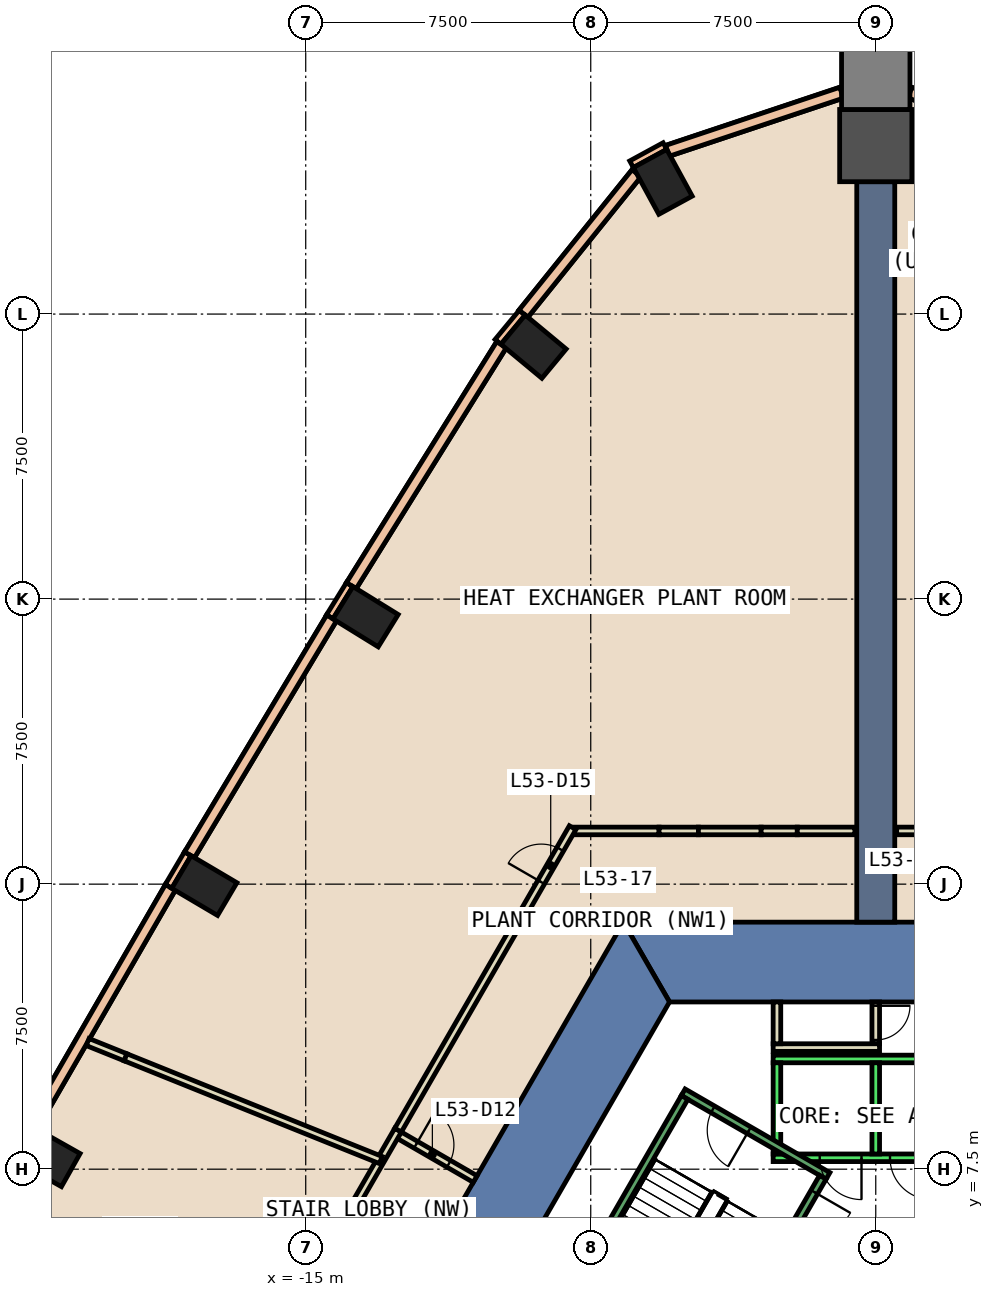
"""IFC4 building model, lengths in metres.
Left out: names, types, materials, properties, quantities, classifications, styles, units other than length and angle.
Written with IfcOpenShell. Run it as: python <this file> out.ifc"""

import sys

from ifc_helpers import new_model, si_unit, direction, frame, frame_2d, origin, origin_2d, place, context, subcontext, project, spatial, polyline, rectangle, outline, extrude, element, fill, save


model = new_model("IFC4")
c1 = context("Model", 3, precision=1e-05, world=origin(), true_north=direction((0.0, 1.0)))
c2 = subcontext(c1, "Body", "Model", "MODEL_VIEW")
j1 = project(units=[si_unit("LENGTHUNIT", "METRE"), si_unit("PLANEANGLEUNIT", "RADIAN")], contexts=[c1])
p1 = place(None, origin())
s1 = spatial("IfcSite", under=j1, at=p1, CompositionType="ELEMENT")
p2 = place(p1, origin())
s2 = spatial("IfcBuilding", under=s1, at=p2, CompositionType="ELEMENT")
p3 = place(p2, frame((0.0, 0.0, 236.0)))
s3 = spatial("IfcBuildingStorey", under=s2, at=p3, CompositionType="ELEMENT", Elevation=236.0)
p4 = place(p3, frame((0.0, 34.433, -0.6), z_axis=(0.0, 0.0, 1.0), x_axis=(0.0, 1.0, 0.0)))
e1 = element("IfcColumn", 1, at=p4, inside=s3, PredefinedType="COLUMN", context=c2, shape_type="SweptSolid", body=[
    extrude(rectangle(XDim=1.9, YDim=1.9, at=origin_2d()), origin(), (0.0, 0.0, 1.0), 5.4),
])
for number, where, z_axis, x_axis in (
    (2, (-5.604, 33.479, -0.6), (0.0, 0.0, 1.0), (0.878, 0.478, 0.0)),
    (3, (-9.005, 29.143, -0.6), (0.0, 0.0, 1.0), (0.639, 0.769, 0.0)),
    (4, (-13.425, 22.037, -0.6), (0.0, 0.0, 1.0), (0.525, 0.851, 0.0)),
    (5, (-17.668, 14.963, -0.6), (0.0, 0.0, 1.0), (0.509, 0.861, 0.0)),
    (6, (-21.792, 7.82, -0.6), (0.0, 0.0, 1.0), (0.491, 0.871, 0.0)),
):
    element("IfcColumn", number, at=place(p3, frame(where, z_axis=z_axis, x_axis=x_axis)), inside=s3, PredefinedType="COLUMN", context=c2, shape_type="SweptSolid", body=[
        extrude(rectangle(XDim=1.0, YDim=1.4, at=origin_2d()), origin(), (0.0, 0.0, 1.0), 5.4),
    ])
p5 = place(p3, frame((0.0, 36.283, -0.6), z_axis=(0.0, 0.0, 1.0), x_axis=(0.0, 1.0, 0.0)))
e7 = element("IfcColumn", 7, at=p5, inside=s3, PredefinedType="COLUMN", context=c2, shape_type="SweptSolid", body=[
    extrude(rectangle(XDim=1.8, YDim=1.8, at=origin_2d()), origin(), (0.0, 0.0, 1.0), 5.4),
])
p6 = place(p3, frame((0.0, 0.0, -0.6)))
e8 = element("IfcWall", 8, at=p6, inside=s3, PredefinedType="SHEAR", context=c2, shape_type="SweptSolid", body=[
    extrude(outline(polyline([(6.64, 14.0), (-6.64, 14.0), (-5.427, 11.9), (5.427, 11.9), (6.64, 14.0)])), origin(), (0.0, 0.0, 1.0), 5.4),
])
p7 = place(p3, frame((0.0, 0.0, -0.6)))
e9 = element("IfcWall", 9, at=p7, inside=s3, PredefinedType="SHEAR", context=c2, shape_type="SweptSolid", body=[
    extrude(outline(polyline([(-11.834, 5.002), (-10.016, 3.952), (-5.427, 11.9), (-6.64, 14.0), (-11.834, 5.002)])), origin(), (0.0, 0.0, 1.0), 5.4),
])
p8 = place(p3, frame((0.0, 14.0, 0.0), z_axis=(0.0, 0.0, 1.0), x_axis=(0.0, 1.0, 0.0)))
e10 = element("IfcWall", 10, at=p8, inside=s3, PredefinedType="SHEAR", context=c2, shape_type="SweptSolid", body=[
    extrude(rectangle(XDim=19.483, YDim=1.0, at=frame_2d((9.741, 0.0))), origin(), (0.0, 0.0, 1.0), 4.8),
])
p9 = place(p3, frame((-5.548, 34.42, 0.0), z_axis=(0.0, 0.0, 1.0), x_axis=(-0.878250009632, -0.478201757191, 0.0)))
e11 = element("IfcWall", 11, at=p9, inside=s3, PredefinedType="STANDARD", context=c2, shape_type="SweptSolid", body=[
    extrude(rectangle(XDim=1.0, YDim=0.2, at=frame_2d((0.5, 0.0))), origin(), (0.0, 0.0, 1.0), 4.8),
])
p10 = place(p3, frame((-9.302, 30.039, 0.0), z_axis=(0.0, 0.0, 1.0), x_axis=(-0.637972365578, -0.770059257953, 0.0)))
e12 = element("IfcWall", 12, at=p10, inside=s3, PredefinedType="STANDARD", context=c2, shape_type="SweptSolid", body=[
    extrude(rectangle(XDim=1.0, YDim=0.2, at=frame_2d((0.5, 0.0))), origin(), (0.0, 0.0, 1.0), 4.8),
])
p11 = place(p3, frame((-13.843, 22.883, 0.0), z_axis=(0.0, 0.0, 1.0), x_axis=(-0.525648735675, -0.850701714282, 0.0)))
e13 = element("IfcWall", 13, at=p11, inside=s3, PredefinedType="STANDARD", context=c2, shape_type="SweptSolid", body=[
    extrude(rectangle(XDim=1.0, YDim=0.2, at=frame_2d((0.5, 0.0))), origin(), (0.0, 0.0, 1.0), 4.8),
])
p12 = place(p3, frame((-18.103, 15.801, 0.0), z_axis=(0.0, 0.0, 1.0), x_axis=(-0.508161541526, -0.861261776531, 0.0)))
e14 = element("IfcWall", 14, at=p12, inside=s3, PredefinedType="STANDARD", context=c2, shape_type="SweptSolid", body=[
    extrude(rectangle(XDim=1.0, YDim=0.2, at=frame_2d((0.5, 0.0))), origin(), (0.0, 0.0, 1.0), 4.8),
])
p13 = place(p3, frame((5.481, 34.296, 0.0), z_axis=(0.0, 0.0, 1.0), x_axis=(-0.948577105871, 0.316546164433, 0.0)))
e15 = element("IfcWall", 15, at=p13, inside=s3, PredefinedType="STANDARD", context=c2, shape_type="SweptSolid", body=[
    extrude(rectangle(XDim=4.83, YDim=0.3, at=frame_2d((2.415, 0.0))), origin(), (0.0, 0.0, 1.0), 1.2),
])
p14 = place(p3, frame((5.481, 34.296, 4.0), z_axis=(0.0, 0.0, 1.0), x_axis=(-0.948577105871, 0.316546164433, 0.0)))
e16 = element("IfcWall", 16, at=p14, inside=s3, PredefinedType="STANDARD", context=c2, shape_type="SweptSolid", body=[
    extrude(rectangle(XDim=4.83, YDim=0.3, at=frame_2d((2.415, 0.0))), origin(), (0.0, 0.0, 1.0), 0.8),
])
p15 = place(p3, frame((-0.899, 35.825, 0.0), z_axis=(0.0, 0.0, 1.0), x_axis=(-0.948577105871, -0.316546164433, 0.0)))
e17 = element("IfcWall", 17, at=p15, inside=s3, PredefinedType="STANDARD", context=c2, shape_type="SweptSolid", body=[
    extrude(rectangle(XDim=4.83, YDim=0.3, at=frame_2d((2.415, 0.0))), origin(), (0.0, 0.0, 1.0), 1.2),
])
p16 = place(p3, frame((-0.899, 35.825, 4.0), z_axis=(0.0, 0.0, 1.0), x_axis=(-0.948577105871, -0.316546164433, 0.0)))
e18 = element("IfcWall", 18, at=p16, inside=s3, PredefinedType="STANDARD", context=c2, shape_type="SweptSolid", body=[
    extrude(rectangle(XDim=4.83, YDim=0.3, at=frame_2d((2.415, 0.0))), origin(), (0.0, 0.0, 1.0), 0.8),
])
p17 = place(p3, frame((-6.296, 33.705, 0.0), z_axis=(0.0, 0.0, 1.0), x_axis=(-0.627115312033, -0.778926431323, 0.0)))
e19 = element("IfcWall", 19, at=p17, inside=s3, PredefinedType="STANDARD", context=c2, shape_type="SweptSolid", body=[
    extrude(rectangle(XDim=4.742, YDim=0.3, at=frame_2d((2.371, 0.0))), origin(), (0.0, 0.0, 1.0), 1.2),
])
p18 = place(p3, frame((-6.296, 33.705, 4.0), z_axis=(0.0, 0.0, 1.0), x_axis=(-0.627115312033, -0.778926431323, 0.0)))
e20 = element("IfcWall", 20, at=p18, inside=s3, PredefinedType="STANDARD", context=c2, shape_type="SweptSolid", body=[
    extrude(rectangle(XDim=4.742, YDim=0.3, at=frame_2d((2.371, 0.0))), origin(), (0.0, 0.0, 1.0), 0.8),
])
p19 = place(p3, frame((-9.848, 29.194, 0.0), z_axis=(0.0, 0.0, 1.0), x_axis=(-0.528961462244, -0.848645845722, 0.0)))
e21 = element("IfcWall", 21, at=p19, inside=s3, PredefinedType="STANDARD", context=c2, shape_type="SweptSolid", body=[
    extrude(rectangle(XDim=7.47, YDim=0.3, at=frame_2d((3.735, 0.0))), origin(), (0.0, 0.0, 1.0), 1.2),
])
p20 = place(p3, frame((-9.848, 29.194, 4.0), z_axis=(0.0, 0.0, 1.0), x_axis=(-0.528961462244, -0.848645845722, 0.0)))
e22 = element("IfcWall", 22, at=p20, inside=s3, PredefinedType="STANDARD", context=c2, shape_type="SweptSolid", body=[
    extrude(rectangle(XDim=7.47, YDim=0.3, at=frame_2d((3.735, 0.0))), origin(), (0.0, 0.0, 1.0), 0.8),
])
p21 = place(p3, frame((-14.32, 22.003, 0.0), z_axis=(0.0, 0.0, 1.0), x_axis=(-0.51437714024, -0.857564083669, 0.0)))
e23 = element("IfcWall", 23, at=p21, inside=s3, PredefinedType="STANDARD", context=c2, shape_type="SweptSolid", body=[
    extrude(rectangle(XDim=7.265, YDim=0.3, at=frame_2d((3.632, 0.0))), origin(), (0.0, 0.0, 1.0), 1.2),
])
p22 = place(p3, frame((-14.32, 22.003, 4.0), z_axis=(0.0, 0.0, 1.0), x_axis=(-0.51437714024, -0.857564083669, 0.0)))
e24 = element("IfcWall", 24, at=p22, inside=s3, PredefinedType="STANDARD", context=c2, shape_type="SweptSolid", body=[
    extrude(rectangle(XDim=7.265, YDim=0.3, at=frame_2d((3.632, 0.0))), origin(), (0.0, 0.0, 1.0), 0.8),
])
p23 = place(p3, frame((-18.563, 14.913, 0.0), z_axis=(0.0, 0.0, 1.0), x_axis=(-0.499980331134, -0.866036759312, 0.0)))
e25 = element("IfcWall", 25, at=p23, inside=s3, PredefinedType="STANDARD", context=c2, shape_type="SweptSolid", body=[
    extrude(rectangle(XDim=7.266, YDim=0.3, at=frame_2d((3.633, 0.0))), origin(), (0.0, 0.0, 1.0), 1.2),
])
p24 = place(p3, frame((-18.563, 14.913, 4.0), z_axis=(0.0, 0.0, 1.0), x_axis=(-0.499980331134, -0.866036759312, 0.0)))
e26 = element("IfcWall", 26, at=p24, inside=s3, PredefinedType="STANDARD", context=c2, shape_type="SweptSolid", body=[
    extrude(rectangle(XDim=7.266, YDim=0.3, at=frame_2d((3.633, 0.0))), origin(), (0.0, 0.0, 1.0), 0.8),
])
p25 = place(p3, frame((0.0, 11.9, 0.0), z_axis=(0.0, 0.0, 1.0), x_axis=(0.0, -1.0, 0.0)))
e27 = element("IfcWall", 27, at=p25, inside=s3, PredefinedType="PARTITIONING", context=c2, shape_type="SweptSolid", body=[
    extrude(rectangle(XDim=1.1, YDim=0.2, at=frame_2d((0.55, 0.0))), origin(), (0.0, 0.0, 1.0), 4.8),
])
p26 = place(p25, frame((0.1, 0.0, 0.0)))
e28 = element("IfcOpeningElement", 28, at=p26, cuts=e27, PredefinedType="OPENING", context=c2, shape_type="SweptSolid", body=[
    extrude(rectangle(XDim=0.9, YDim=2.1, at=frame_2d((0.45, 1.05))), frame((0.0, 0.11, 0.0), z_axis=(0.0, -1.0, 0.0), x_axis=(1.0, 0.0, 0.0)), (0.0, 0.0, 1.0), 0.22),
])
p27 = place(p3, frame((0.1, 10.7, 0.0), z_axis=(0.0, 0.0, 1.0), x_axis=(-1.0, 0.0, 0.0)))
e29 = element("IfcWall", 29, at=p27, inside=s3, PredefinedType="PARTITIONING", context=c2, shape_type="SweptSolid", body=[
    extrude(rectangle(XDim=2.8, YDim=0.2, at=frame_2d((1.4, 0.0))), origin(), (0.0, 0.0, 1.0), 4.8),
])
p28 = place(p3, frame((-2.6, 10.8, 0.0), z_axis=(0.0, 0.0, 1.0), x_axis=(0.0, 1.0, 0.0)))
e30 = element("IfcWall", 30, at=p28, inside=s3, PredefinedType="PARTITIONING", context=c2, shape_type="SweptSolid", body=[
    extrude(rectangle(XDim=1.1, YDim=0.2, at=frame_2d((0.55, 0.0))), origin(), (0.0, 0.0, 1.0), 4.8),
])
p29 = place(p3, frame((0.55, 16.4, 0.0), z_axis=(0.0, 0.0, 1.0), x_axis=(1.0, 0.0, 0.0)))
e31 = element("IfcWall", 31, at=p29, inside=s3, PredefinedType="PARTITIONING", context=c2, shape_type="SweptSolid", body=[
    extrude(rectangle(XDim=2.294, YDim=0.2, at=frame_2d((1.147, 0.0))), origin(), (0.0, 0.0, 1.0), 4.8),
])
p30 = place(p29, frame((0.614, 0.0, 0.0)))
e32 = element("IfcOpeningElement", 32, at=p30, cuts=e31, PredefinedType="OPENING", context=c2, shape_type="SweptSolid", body=[
    extrude(rectangle(XDim=1.0, YDim=2.1, at=frame_2d((0.5, 1.05))), frame((0.0, 0.11, 0.0), z_axis=(0.0, -1.0, 0.0), x_axis=(1.0, 0.0, 0.0)), (0.0, 0.0, 1.0), 0.22),
])
p31 = place(p3, frame((0.0, 35.403, 0.0), z_axis=(0.0, 0.0, 1.0), x_axis=(0.0, 1.0, 0.0)))
e33 = element("IfcWall", 33, at=p31, inside=s3, PredefinedType="PARTITIONING", context=c2, shape_type="SweptSolid", body=[
    extrude(rectangle(XDim=0.5, YDim=0.2, at=frame_2d((0.25, 0.0))), origin(), (0.0, 0.0, 1.0), 4.8),
])
p32 = place(p3, frame((-12.62, 8.441, 0.0), z_axis=(0.0, 0.0, 1.0), x_axis=(0.865999212041, -0.500045362686, 0.0)))
e34 = element("IfcWall", 34, at=p32, inside=s3, PredefinedType="PARTITIONING", context=c2, shape_type="SweptSolid", body=[
    extrude(rectangle(XDim=2.4, YDim=0.2, at=frame_2d((1.2, 0.0))), origin(), (0.0, 0.0, 1.0), 4.8),
])
p33 = place(p32, frame((0.6, 0.0, 0.0)))
e35 = element("IfcOpeningElement", 35, at=p33, cuts=e34, PredefinedType="OPENING", context=c2, shape_type="SweptSolid", body=[
    extrude(rectangle(XDim=1.0, YDim=2.1, at=frame_2d((0.5, 1.05))), frame((0.0, 0.11, 0.0), z_axis=(0.0, -1.0, 0.0), x_axis=(1.0, 0.0, 0.0)), (0.0, 0.0, 1.0), 0.22),
])
p34 = place(p3, frame((-16.17, 2.292, 0.0), z_axis=(0.0, 0.0, 1.0), x_axis=(0.499942581134, 0.866058552045, 0.0)))
e36 = element("IfcWall", 36, at=p34, inside=s3, PredefinedType="PARTITIONING", context=c2, shape_type="SweptSolid", body=[
    extrude(rectangle(XDim=7.2, YDim=0.2, at=frame_2d((3.6, 0.0))), origin(), (0.0, 0.0, 1.0), 4.8),
])
p35 = place(p34, frame((2.51, 0.0, 0.0)))
e37 = element("IfcOpeningElement", 37, at=p35, cuts=e36, PredefinedType="OPENING", context=c2, shape_type="SweptSolid", body=[
    extrude(rectangle(XDim=1.0, YDim=2.1, at=frame_2d((0.5, 1.05))), frame((0.0, 0.11, 0.0), z_axis=(0.0, -1.0, 0.0), x_axis=(1.0, 0.0, 0.0)), (0.0, 0.0, 1.0), 0.22),
])
p36 = place(p3, frame((-7.926, 16.4, 0.0), z_axis=(0.0, 0.0, 1.0), x_axis=(1.0, 0.0, 0.0)))
e38 = element("IfcWall", 38, at=p36, inside=s3, PredefinedType="PARTITIONING", context=c2, shape_type="SweptSolid", body=[
    extrude(rectangle(XDim=2.224, YDim=0.2, at=frame_2d((1.112, 0.0))), origin(), (0.0, 0.0, 1.0), 4.8),
])
p37 = place(p3, frame((-12.57, 8.528, 0.0), z_axis=(0.0, 0.0, 1.0), x_axis=(0.499907967521, 0.866078532241, 0.0)))
e39 = element("IfcWall", 39, at=p37, inside=s3, PredefinedType="PARTITIONING", context=c2, shape_type="SweptSolid", body=[
    extrude(rectangle(XDim=9.19, YDim=0.2, at=frame_2d((4.595, 0.0))), origin(), (0.0, 0.0, 1.0), 4.8),
])
p38 = place(p37, frame((7.535, 0.0, 0.0)))
e40 = element("IfcOpeningElement", 40, at=p38, cuts=e39, PredefinedType="OPENING", context=c2, shape_type="SweptSolid", body=[
    extrude(rectangle(XDim=1.0, YDim=2.1, at=frame_2d((0.5, 1.05))), frame((0.0, 0.11, 0.0), z_axis=(0.0, -1.0, 0.0), x_axis=(1.0, 0.0, 0.0)), (0.0, 0.0, 1.0), 0.22),
])
p39 = place(p3, frame((-20.738, 10.845, 0.0), z_axis=(0.0, 0.0, 1.0), x_axis=(0.927817184834, -0.373035214862, 0.0)))
e41 = element("IfcWall", 41, at=p39, inside=s3, PredefinedType="PARTITIONING", context=c2, shape_type="SweptSolid", body=[
    extrude(rectangle(XDim=1.075, YDim=0.2, at=frame_2d((0.537, 0.0))), origin(), (0.0, 0.0, 1.0), 2.4),
])
p40 = place(p3, frame((-5.702, 16.4, 0.0), z_axis=(0.0, 0.0, 1.0), x_axis=(1.0, 0.0, 0.0)))
e42 = element("IfcWall", 42, at=p40, inside=s3, PredefinedType="PARTITIONING", context=c2, shape_type="SweptSolid", body=[
    extrude(rectangle(XDim=1.035, YDim=0.2, at=frame_2d((0.518, 0.0))), origin(), (0.0, 0.0, 1.0), 2.4),
])
p41 = place(p3, frame((-4.667, 16.4, 0.0), z_axis=(0.0, 0.0, 1.0), x_axis=(1.0, 0.0, 0.0)))
e43 = element("IfcWall", 43, at=p41, inside=s3, PredefinedType="PARTITIONING", context=c2, shape_type="SweptSolid", body=[
    extrude(rectangle(XDim=1.651, YDim=0.2, at=frame_2d((0.825, 0.0))), origin(), (0.0, 0.0, 1.0), 4.8),
])
p42 = place(p3, frame((-3.016, 16.4, 0.0), z_axis=(0.0, 0.0, 1.0), x_axis=(1.0, 0.0, 0.0)))
e44 = element("IfcWall", 44, at=p42, inside=s3, PredefinedType="PARTITIONING", context=c2, shape_type="SweptSolid", body=[
    extrude(rectangle(XDim=0.951, YDim=0.2, at=frame_2d((0.476, 0.0))), origin(), (0.0, 0.0, 1.0), 2.4),
])
p43 = place(p3, frame((-2.065, 16.4, 0.0), z_axis=(0.0, 0.0, 1.0), x_axis=(1.0, 0.0, 0.0)))
e45 = element("IfcWall", 45, at=p43, inside=s3, PredefinedType="PARTITIONING", context=c2, shape_type="SweptSolid", body=[
    extrude(rectangle(XDim=1.515, YDim=0.2, at=frame_2d((0.757, 0.0))), origin(), (0.0, 0.0, 1.0), 4.8),
])
p44 = place(p3, frame((-19.741, 10.444, 0.0), z_axis=(0.0, 0.0, 1.0), x_axis=(0.927679169768, -0.373378304107, 0.0)))
e46 = element("IfcWall", 46, at=p44, inside=s3, PredefinedType="PARTITIONING", context=c2, shape_type="SweptSolid", body=[
    extrude(rectangle(XDim=7.24, YDim=0.2, at=frame_2d((3.62, 0.0))), origin(), (0.0, 0.0, 1.0), 4.8),
])
p45 = place(p3, frame((2.7, 7.8, 0.0), z_axis=(0.0, 0.0, 1.0), x_axis=(-1.0, 0.0, 0.0)))
e47 = element("IfcWall", 47, at=p45, inside=s3, PredefinedType="STANDARD", context=c2, shape_type="SweptSolid", body=[
    extrude(rectangle(XDim=5.4, YDim=0.2, at=frame_2d((2.7, 0.0))), origin(), (0.0, 0.0, 1.0), 4.8),
])
p46 = place(p45, frame((1.225, 0.0, 0.0)))
e48 = element("IfcOpeningElement", 48, at=p46, cuts=e47, PredefinedType="OPENING", context=c2, shape_type="SweptSolid", body=[
    extrude(rectangle(XDim=1.1, YDim=2.1, at=frame_2d((0.55, 1.05))), frame((0.0, 0.11, 0.0), z_axis=(0.0, -1.0, 0.0), x_axis=(1.0, 0.0, 0.0)), (0.0, 0.0, 1.0), 0.22),
])
p47 = place(p45, frame((3.075, 0.0, 0.0)))
e49 = element("IfcOpeningElement", 49, at=p47, cuts=e47, PredefinedType="OPENING", context=c2, shape_type="SweptSolid", body=[
    extrude(rectangle(XDim=1.1, YDim=2.1, at=frame_2d((0.55, 1.05))), frame((0.0, 0.11, 0.0), z_axis=(0.0, -1.0, 0.0), x_axis=(1.0, 0.0, 0.0)), (0.0, 0.0, 1.0), 0.22),
])
p48 = place(p3, frame((2.7, 10.4, 0.0), z_axis=(0.0, 0.0, 1.0), x_axis=(-1.0, 0.0, 0.0)))
e50 = element("IfcWall", 50, at=p48, inside=s3, PredefinedType="STANDARD", context=c2, shape_type="SweptSolid", body=[
    extrude(rectangle(XDim=5.4, YDim=0.2, at=frame_2d((2.7, 0.0))), origin(), (0.0, 0.0, 1.0), 4.8),
])
for number, where, z_axis, x_axis in (
    (51, (0.0, 7.9, 0.0), (0.0, 0.0, 1.0), (0.0, 1.0, 0.0)),
    (52, (-2.6, 7.9, 0.0), (0.0, 0.0, 1.0), (0.0, 1.0, 0.0)),
):
    element("IfcWall", number, at=place(p3, frame(where, z_axis=z_axis, x_axis=x_axis)), inside=s3, PredefinedType="STANDARD", context=c2, shape_type="SweptSolid", body=[
        extrude(rectangle(XDim=2.4, YDim=0.2, at=frame_2d((1.2, 0.0))), origin(), (0.0, 0.0, 1.0), 4.8),
    ])
p49 = place(p3, frame((-1.256, 7.324, 0.0), z_axis=(0.0, 0.0, 1.0), x_axis=(-0.866046073146, 0.499964197906, 0.0)))
e53 = element("IfcWall", 53, at=p49, inside=s3, PredefinedType="STANDARD", context=c2, shape_type="SweptSolid", body=[
    extrude(rectangle(XDim=4.4, YDim=0.2, at=frame_2d((2.2, 0.0))), origin(), (0.0, 0.0, 1.0), 4.8),
])
p50 = place(p49, frame((2.4, 0.0, 0.0)))
e54 = element("IfcOpeningElement", 54, at=p50, cuts=e53, PredefinedType="OPENING", context=c2, shape_type="SweptSolid", body=[
    extrude(rectangle(XDim=1.1, YDim=2.2, at=frame_2d((0.55, 1.1))), frame((0.0, 0.11, 0.0), z_axis=(0.0, -1.0, 0.0), x_axis=(1.0, 0.0, 0.0)), (0.0, 0.0, 1.0), 0.22),
])
p51 = place(p3, frame((-1.393, 7.288, 0.0), z_axis=(0.0, 0.0, 1.0), x_axis=(-0.499963383562, -0.866046543262, 0.0)))
e55 = element("IfcWall", 55, at=p51, inside=s3, PredefinedType="STANDARD", context=c2, shape_type="SweptSolid", body=[
    extrude(rectangle(XDim=6.9, YDim=0.2, at=frame_2d((3.45, 0.0))), origin(), (0.0, 0.0, 1.0), 4.8),
])
p52 = place(p51, frame((0.45, 0.0, 0.0)))
e56 = element("IfcOpeningElement", 56, at=p52, cuts=e55, PredefinedType="OPENING", context=c2, shape_type="SweptSolid", body=[
    extrude(rectangle(XDim=1.1, YDim=2.2, at=frame_2d((0.55, 1.1))), frame((0.0, 0.11, 0.0), z_axis=(0.0, -1.0, 0.0), x_axis=(1.0, 0.0, 0.0)), (0.0, 0.0, 1.0), 0.22),
])
p53 = place(p3, frame((-5.03, 9.388, 0.0), z_axis=(0.0, 0.0, 1.0), x_axis=(-0.499978703459, -0.866037698999, 0.0)))
e57 = element("IfcWall", 57, at=p53, inside=s3, PredefinedType="STANDARD", context=c2, shape_type="SweptSolid", body=[
    extrude(rectangle(XDim=6.9, YDim=0.2, at=frame_2d((3.45, 0.0))), origin(), (0.0, 0.0, 1.0), 4.8),
])
p54 = place(p33, origin())
e58 = element("IfcDoor", 58, at=p54, inside=s3, OperationType="SINGLE_SWING_RIGHT", PredefinedType="DOOR", context=c2, shape_type="SweptSolid", body=[
    extrude(rectangle(XDim=1.0, YDim=2.1, at=frame_2d((0.5, 1.05))), frame((0.0, 0.025, 0.0), z_axis=(0.0, -1.0, 0.0), x_axis=(1.0, 0.0, 0.0)), (0.0, 0.0, 1.0), 0.05),
])
fill(e35, e58)
p55 = place(p38, origin())
e59 = element("IfcDoor", 59, at=p55, inside=s3, OperationType="SINGLE_SWING_LEFT", PredefinedType="DOOR", context=c2, shape_type="SweptSolid", body=[
    extrude(rectangle(XDim=1.0, YDim=2.1, at=frame_2d((0.5, 1.05))), frame((0.0, 0.025, 0.0), z_axis=(0.0, -1.0, 0.0), x_axis=(1.0, 0.0, 0.0)), (0.0, 0.0, 1.0), 0.05),
])
fill(e40, e59)
p56 = place(p26, origin())
e60 = element("IfcDoor", 60, at=p56, inside=s3, OperationType="SINGLE_SWING_LEFT", PredefinedType="DOOR", context=c2, shape_type="SweptSolid", body=[
    extrude(rectangle(XDim=0.9, YDim=2.1, at=frame_2d((0.45, 1.05))), frame((0.0, 0.025, 0.0), z_axis=(0.0, -1.0, 0.0), x_axis=(1.0, 0.0, 0.0)), (0.0, 0.0, 1.0), 0.05),
])
fill(e28, e60)
p57 = place(p46, origin())
e61 = element("IfcDoor", 61, at=p57, inside=s3, OperationType="SLIDING_TO_LEFT", PredefinedType="DOOR", context=c2, shape_type="SweptSolid", body=[
    extrude(rectangle(XDim=1.1, YDim=2.1, at=frame_2d((0.55, 1.05))), frame((0.0, 0.025, 0.0), z_axis=(0.0, -1.0, 0.0), x_axis=(1.0, 0.0, 0.0)), (0.0, 0.0, 1.0), 0.05),
])
fill(e48, e61)
p58 = place(p47, origin())
e62 = element("IfcDoor", 62, at=p58, inside=s3, OperationType="SLIDING_TO_LEFT", PredefinedType="DOOR", context=c2, shape_type="SweptSolid", body=[
    extrude(rectangle(XDim=1.1, YDim=2.1, at=frame_2d((0.55, 1.05))), frame((0.0, 0.025, 0.0), z_axis=(0.0, -1.0, 0.0), x_axis=(1.0, 0.0, 0.0)), (0.0, 0.0, 1.0), 0.05),
])
fill(e49, e62)
p59 = place(p52, origin())
e63 = element("IfcDoor", 63, at=p59, inside=s3, OperationType="SINGLE_SWING_LEFT", PredefinedType="DOOR", context=c2, shape_type="SweptSolid", body=[
    extrude(rectangle(XDim=1.1, YDim=2.2, at=frame_2d((0.55, 1.1))), frame((0.0, 0.025, 0.0), z_axis=(0.0, -1.0, 0.0), x_axis=(1.0, 0.0, 0.0)), (0.0, 0.0, 1.0), 0.05),
])
fill(e56, e63)
p60 = place(p50, origin())
e64 = element("IfcDoor", 64, at=p60, inside=s3, OperationType="SINGLE_SWING_LEFT", PredefinedType="DOOR", context=c2, shape_type="SweptSolid", body=[
    extrude(rectangle(XDim=1.1, YDim=2.2, at=frame_2d((0.55, 1.1))), frame((0.0, 0.025, 0.0), z_axis=(0.0, -1.0, 0.0), x_axis=(1.0, 0.0, 0.0)), (0.0, 0.0, 1.0), 0.05),
])
fill(e54, e64)
save(model, sys.argv[1])
